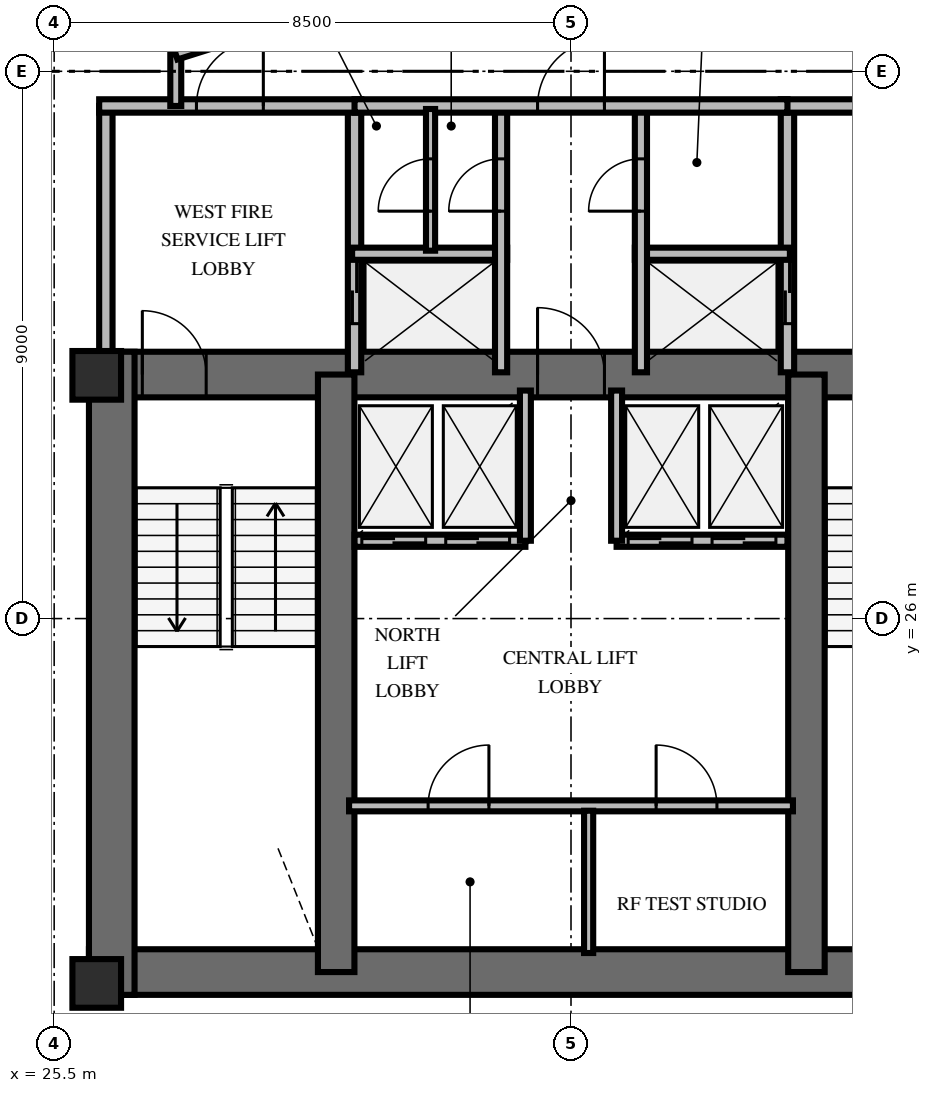
"""IFC4 building model, lengths in metres.
Left out: names, types, materials, properties, quantities, classifications, styles, units other than length and angle.
Written with IfcOpenShell. Run it as: python <this file> out.ifc"""

import sys

from ifc_helpers import new_model, si_unit, direction, frame, frame_2d, origin, origin_2d, place, context, subcontext, project, spatial, rectangle, extrude, element, fill, save


model = new_model("IFC4")
c1 = context("Model", 3, precision=1e-05, world=origin(), true_north=direction((0.0, 1.0)))
c2 = subcontext(c1, "Body", "Model", "MODEL_VIEW")
j1 = project(units=[si_unit("LENGTHUNIT", "METRE"), si_unit("PLANEANGLEUNIT", "RADIAN")], contexts=[c1])
p1 = place(None, origin())
s1 = spatial("IfcSite", under=j1, at=p1, CompositionType="ELEMENT")
p2 = place(p1, origin())
s2 = spatial("IfcBuilding", under=s1, at=p2, CompositionType="ELEMENT")
p3 = place(p2, frame((0.0, 0.0, 170.0)))
s3 = spatial("IfcBuildingStorey", under=s2, at=p3, CompositionType="ELEMENT", Elevation=170.0)
p4 = place(p3, frame((26.072, 20.187, 0.0), z_axis=(0.0, 0.0, 1.0), x_axis=(1.0, 0.0, 0.0)))
e1 = element("IfcWall", 1, at=p4, inside=s3, PredefinedType="SHEAR", context=c2, shape_type="SweptSolid", body=[
    extrude(rectangle(XDim=15.866, YDim=0.75, at=frame_2d((7.933, 0.0))), origin(), (0.0, 0.0, 1.0), 3.6),
])
p5 = place(p3, frame((26.072, 30.013, 0.0), z_axis=(0.0, 0.0, 1.0), x_axis=(1.0, 0.0, 0.0)))
e2 = element("IfcWall", 2, at=p5, inside=s3, PredefinedType="SHEAR", context=c2, shape_type="SweptSolid", body=[
    extrude(rectangle(XDim=15.866, YDim=0.75, at=frame_2d((7.933, 0.0))), origin(), (0.0, 0.0, 1.0), 3.6),
])
p6 = place(p5, frame((0.878, 0.0, 0.0)))
e3 = element("IfcOpeningElement", 3, at=p6, cuts=e2, PredefinedType="OPENING", context=c2, shape_type="SweptSolid", body=[
    extrude(rectangle(XDim=1.05, YDim=2.15, at=frame_2d((0.525, 1.075))), frame((0.0, 0.385, 0.0), z_axis=(0.0, -1.0, 0.0), x_axis=(1.0, 0.0, 0.0)), (0.0, 0.0, 1.0), 0.77),
])
p7 = place(p5, frame((13.928, 0.0, 0.0)))
e4 = element("IfcOpeningElement", 4, at=p7, cuts=e2, PredefinedType="OPENING", context=c2, shape_type="SweptSolid", body=[
    extrude(rectangle(XDim=1.05, YDim=2.15, at=frame_2d((0.525, 1.075))), frame((0.0, 0.385, 0.0), z_axis=(0.0, -1.0, 0.0), x_axis=(1.0, 0.0, 0.0)), (0.0, 0.0, 1.0), 0.77),
])
p8 = place(p5, frame((7.378, 0.0, 0.0)))
e5 = element("IfcOpeningElement", 5, at=p8, cuts=e2, PredefinedType="OPENING", context=c2, shape_type="SweptSolid", body=[
    extrude(rectangle(XDim=1.1, YDim=2.15, at=frame_2d((0.55, 1.075))), frame((0.0, 0.385, 0.0), z_axis=(0.0, -1.0, 0.0), x_axis=(1.0, 0.0, 0.0)), (0.0, 0.0, 1.0), 0.77),
])
p9 = place(p3, frame((26.447, 19.812, 0.0), z_axis=(0.0, 0.0, 1.0), x_axis=(0.0, 1.0, 0.0)))
e6 = element("IfcWall", 6, at=p9, inside=s3, PredefinedType="SHEAR", context=c2, shape_type="SweptSolid", body=[
    extrude(rectangle(XDim=10.576, YDim=0.75, at=frame_2d((5.288, 0.0))), origin(), (0.0, 0.0, 1.0), 3.6),
])
for number, where, z_axis, x_axis in (
    (7, (30.138, 20.187, 0.0), (0.0, 0.0, 1.0), (0.0, 1.0, 0.0)),
    (8, (37.872, 20.187, 0.0), (0.0, 0.0, 1.0), (0.0, 1.0, 0.0)),
):
    element("IfcWall", number, at=place(p3, frame(where, z_axis=z_axis, x_axis=x_axis)), inside=s3, PredefinedType="SHEAR", context=c2, shape_type="SweptSolid", body=[
        extrude(rectangle(XDim=9.826, YDim=0.6, at=frame_2d((4.913, 0.0))), origin(), (0.0, 0.0, 1.0), 3.6),
    ])
for number, where, z_axis, x_axis in (
    (9, (26.2, 20.0, 0.0), (0.0, 0.0, 1.0), (1.0, 0.0, 0.0)),
    (10, (26.2, 30.0, 0.0), (0.0, 0.0, 1.0), (1.0, 0.0, 0.0)),
):
    element("IfcColumn", number, at=place(p3, frame(where, z_axis=z_axis, x_axis=x_axis)), inside=s3, PredefinedType="PILASTER", context=c2, shape_type="SweptSolid", body=[
        extrude(rectangle(XDim=0.8, YDim=0.8, at=origin_2d()), origin(), (0.0, 0.0, 1.0), 3.6),
    ])
p10 = place(p3, frame((26.35, 30.05, 0.0), z_axis=(0.0, 0.0, 1.0), x_axis=(0.0, 1.0, 0.0)))
e11 = element("IfcWall", 11, at=p10, inside=s3, PredefinedType="SOLIDWALL", context=c2, shape_type="SweptSolid", body=[
    extrude(rectangle(XDim=4.38, YDim=0.22, at=frame_2d((2.19, 0.0))), origin(), (0.0, 0.0, 1.0), 2.46),
])
p11 = place(p3, frame((30.44, 30.05, 0.0), z_axis=(0.0, 0.0, 1.0), x_axis=(0.0, 1.0, 0.0)))
e12 = element("IfcWall", 12, at=p11, inside=s3, PredefinedType="SOLIDWALL", context=c2, shape_type="SweptSolid", body=[
    extrude(rectangle(XDim=4.38, YDim=0.22, at=frame_2d((2.19, 0.0))), origin(), (0.0, 0.0, 1.0), 2.46),
])
p12 = place(p11, frame((0.8, 0.0, 0.0)))
e13 = element("IfcOpeningElement", 13, at=p12, cuts=e12, PredefinedType="OPENING", context=c2, shape_type="SweptSolid", body=[
    extrude(rectangle(XDim=1.05, YDim=2.1, at=frame_2d((0.525, 1.05))), frame((0.0, 0.12, 0.0), z_axis=(0.0, -1.0, 0.0), x_axis=(1.0, 0.0, 0.0)), (0.0, 0.0, 1.0), 0.24),
])
p13 = place(p3, frame((26.24, 34.43, 0.0), z_axis=(0.0, 0.0, 1.0), x_axis=(1.0, 0.0, 0.0)))
e14 = element("IfcWall", 14, at=p13, inside=s3, PredefinedType="SOLIDWALL", context=c2, shape_type="SweptSolid", body=[
    extrude(rectangle(XDim=4.31, YDim=0.22, at=frame_2d((2.155, 0.0))), origin(), (0.0, 0.0, 1.0), 2.46),
])
p14 = place(p13, frame((1.6, 0.0, 0.0)))
e15 = element("IfcOpeningElement", 15, at=p14, cuts=e14, PredefinedType="OPENING", context=c2, shape_type="SweptSolid", body=[
    extrude(rectangle(XDim=1.1, YDim=2.15, at=frame_2d((0.55, 1.075))), frame((0.0, 0.12, 0.0), z_axis=(0.0, -1.0, 0.0), x_axis=(1.0, 0.0, 0.0)), (0.0, 0.0, 1.0), 0.24),
])
p15 = place(p3, frame((30.4, 32.0, 0.0), z_axis=(0.0, 0.0, 1.0), x_axis=(1.0, 0.0, 0.0)))
e16 = element("IfcWall", 16, at=p15, inside=s3, PredefinedType="SOLIDWALL", context=c2, shape_type="SweptSolid", body=[
    extrude(rectangle(XDim=2.55, YDim=0.2, at=frame_2d((1.275, 0.0))), origin(), (0.0, 0.0, 1.0), 2.46),
])
p16 = place(p3, frame((32.85, 30.05, 0.0), z_axis=(0.0, 0.0, 1.0), x_axis=(0.0, 1.0, 0.0)))
e17 = element("IfcWall", 17, at=p16, inside=s3, PredefinedType="SOLIDWALL", context=c2, shape_type="SweptSolid", body=[
    extrude(rectangle(XDim=4.38, YDim=0.2, at=frame_2d((2.19, 0.0))), origin(), (0.0, 0.0, 1.0), 2.46),
])
p17 = place(p16, frame((2.65, 0.0, 0.0)))
e18 = element("IfcOpeningElement", 18, at=p17, cuts=e17, PredefinedType="OPENING", context=c2, shape_type="SweptSolid", body=[
    extrude(rectangle(XDim=0.86, YDim=2.05, at=frame_2d((0.43, 1.025))), frame((0.0, 0.11, 0.0), z_axis=(0.0, -1.0, 0.0), x_axis=(1.0, 0.0, 0.0)), (0.0, 0.0, 1.0), 0.22),
])
p18 = place(p3, frame((37.56, 30.05, 0.0), z_axis=(0.0, 0.0, 1.0), x_axis=(0.0, 1.0, 0.0)))
e19 = element("IfcWall", 19, at=p18, inside=s3, PredefinedType="SOLIDWALL", context=c2, shape_type="SweptSolid", body=[
    extrude(rectangle(XDim=4.38, YDim=0.22, at=frame_2d((2.19, 0.0))), origin(), (0.0, 0.0, 1.0), 2.46),
])
p19 = place(p18, frame((0.8, 0.0, 0.0)))
e20 = element("IfcOpeningElement", 20, at=p19, cuts=e19, PredefinedType="OPENING", context=c2, shape_type="SweptSolid", body=[
    extrude(rectangle(XDim=1.05, YDim=2.1, at=frame_2d((0.525, 1.05))), frame((0.0, 0.12, 0.0), z_axis=(0.0, -1.0, 0.0), x_axis=(1.0, 0.0, 0.0)), (0.0, 0.0, 1.0), 0.24),
])
p20 = place(p3, frame((37.45, 34.43, 0.0), z_axis=(0.0, 0.0, 1.0), x_axis=(1.0, 0.0, 0.0)))
e21 = element("IfcWall", 21, at=p20, inside=s3, PredefinedType="SOLIDWALL", context=c2, shape_type="SweptSolid", body=[
    extrude(rectangle(XDim=4.31, YDim=0.22, at=frame_2d((2.155, 0.0))), origin(), (0.0, 0.0, 1.0), 2.46),
])
p21 = place(p20, frame((1.6, 0.0, 0.0)))
e22 = element("IfcOpeningElement", 22, at=p21, cuts=e21, PredefinedType="OPENING", context=c2, shape_type="SweptSolid", body=[
    extrude(rectangle(XDim=1.1, YDim=2.15, at=frame_2d((0.55, 1.075))), frame((0.0, 0.12, 0.0), z_axis=(0.0, -1.0, 0.0), x_axis=(1.0, 0.0, 0.0)), (0.0, 0.0, 1.0), 0.24),
])
p22 = place(p3, frame((35.05, 32.0, 0.0), z_axis=(0.0, 0.0, 1.0), x_axis=(1.0, 0.0, 0.0)))
e23 = element("IfcWall", 23, at=p22, inside=s3, PredefinedType="SOLIDWALL", context=c2, shape_type="SweptSolid", body=[
    extrude(rectangle(XDim=2.55, YDim=0.2, at=frame_2d((1.275, 0.0))), origin(), (0.0, 0.0, 1.0), 2.46),
])
p23 = place(p3, frame((35.15, 30.05, 0.0), z_axis=(0.0, 0.0, 1.0), x_axis=(0.0, 1.0, 0.0)))
e24 = element("IfcWall", 24, at=p23, inside=s3, PredefinedType="SOLIDWALL", context=c2, shape_type="SweptSolid", body=[
    extrude(rectangle(XDim=4.38, YDim=0.2, at=frame_2d((2.19, 0.0))), origin(), (0.0, 0.0, 1.0), 2.46),
])
p24 = place(p23, frame((2.65, 0.0, 0.0)))
e25 = element("IfcOpeningElement", 25, at=p24, cuts=e24, PredefinedType="OPENING", context=c2, shape_type="SweptSolid", body=[
    extrude(rectangle(XDim=0.86, YDim=2.05, at=frame_2d((0.43, 1.025))), frame((0.0, 0.11, 0.0), z_axis=(0.0, -1.0, 0.0), x_axis=(1.0, 0.0, 0.0)), (0.0, 0.0, 1.0), 0.22),
])
p25 = place(p3, frame((30.44, 34.43, 0.0), z_axis=(0.0, 0.0, 1.0), x_axis=(1.0, 0.0, 0.0)))
e26 = element("IfcWall", 26, at=p25, inside=s3, PredefinedType="SOLIDWALL", context=c2, shape_type="SweptSolid", body=[
    extrude(rectangle(XDim=7.12, YDim=0.22, at=frame_2d((3.56, 0.0))), origin(), (0.0, 0.0, 1.0), 2.46),
])
p26 = place(p25, frame((3.01, 0.0, 0.0)))
e27 = element("IfcOpeningElement", 27, at=p26, cuts=e26, PredefinedType="OPENING", context=c2, shape_type="SweptSolid", body=[
    extrude(rectangle(XDim=1.1, YDim=2.15, at=frame_2d((0.55, 1.075))), frame((0.0, 0.12, 0.0), z_axis=(0.0, -1.0, 0.0), x_axis=(1.0, 0.0, 0.0)), (0.0, 0.0, 1.0), 0.24),
])
p27 = place(p3, frame((31.69, 32.05, 0.0), z_axis=(0.0, 0.0, 1.0), x_axis=(0.0, 1.0, 0.0)))
e28 = element("IfcWall", 28, at=p27, inside=s3, PredefinedType="PARTITIONING", context=c2, shape_type="SweptSolid", body=[
    extrude(rectangle(XDim=2.33, YDim=0.15, at=frame_2d((1.165, 0.0))), origin(), (0.0, 0.0, 1.0), 2.46),
])
p28 = place(p27, frame((0.65, 0.0, 0.0)))
e29 = element("IfcOpeningElement", 29, at=p28, cuts=e28, PredefinedType="OPENING", context=c2, shape_type="SweptSolid", body=[
    extrude(rectangle(XDim=0.86, YDim=2.05, at=frame_2d((0.43, 1.025))), frame((0.0, 0.085, 0.0), z_axis=(0.0, -1.0, 0.0), x_axis=(1.0, 0.0, 0.0)), (0.0, 0.0, 1.0), 0.17),
])
p29 = place(p3, frame((30.35, 22.92, 0.0), z_axis=(0.0, 0.0, 1.0), x_axis=(1.0, 0.0, 0.0)))
e30 = element("IfcWall", 30, at=p29, inside=s3, PredefinedType="PARTITIONING", context=c2, shape_type="SweptSolid", body=[
    extrude(rectangle(XDim=7.3, YDim=0.18, at=frame_2d((3.65, 0.0))), origin(), (0.0, 0.0, 1.0), 2.46),
])
p30 = place(p29, frame((1.3, 0.0, 0.0)))
e31 = element("IfcOpeningElement", 31, at=p30, cuts=e30, PredefinedType="OPENING", context=c2, shape_type="SweptSolid", body=[
    extrude(rectangle(XDim=1.0, YDim=2.15, at=frame_2d((0.5, 1.075))), frame((0.0, 0.1, 0.0), z_axis=(0.0, -1.0, 0.0), x_axis=(1.0, 0.0, 0.0)), (0.0, 0.0, 1.0), 0.2),
])
p31 = place(p29, frame((5.05, 0.0, 0.0)))
e32 = element("IfcOpeningElement", 32, at=p31, cuts=e30, PredefinedType="OPENING", context=c2, shape_type="SweptSolid", body=[
    extrude(rectangle(XDim=1.0, YDim=2.15, at=frame_2d((0.5, 1.075))), frame((0.0, 0.1, 0.0), z_axis=(0.0, -1.0, 0.0), x_axis=(1.0, 0.0, 0.0)), (0.0, 0.0, 1.0), 0.2),
])
p32 = place(p3, frame((34.29, 20.5, 0.0), z_axis=(0.0, 0.0, 1.0), x_axis=(0.0, 1.0, 0.0)))
e33 = element("IfcWall", 33, at=p32, inside=s3, PredefinedType="PARTITIONING", context=c2, shape_type="SweptSolid", body=[
    extrude(rectangle(XDim=2.34, YDim=0.15, at=frame_2d((1.17, 0.0))), origin(), (0.0, 0.0, 1.0), 2.46),
])
p33 = place(p3, frame((30.44, 27.28, 0.0), z_axis=(0.0, 0.0, 1.0), x_axis=(1.0, 0.0, 0.0)))
e34 = element("IfcWall", 34, at=p33, inside=s3, PredefinedType="SOLIDWALL", context=c2, shape_type="SweptSolid", body=[
    extrude(rectangle(XDim=2.81, YDim=0.2, at=frame_2d((1.405, 0.0))), origin(), (0.0, 0.0, 1.0), 2.46),
])
p34 = place(p33, frame((0.12, 0.0, 0.0)))
e35 = element("IfcOpeningElement", 35, at=p34, cuts=e34, PredefinedType="OPENING", context=c2, shape_type="SweptSolid", body=[
    extrude(rectangle(XDim=1.05, YDim=2.1, at=frame_2d((0.525, 1.05))), frame((0.0, 0.11, 0.0), z_axis=(0.0, -1.0, 0.0), x_axis=(1.0, 0.0, 0.0)), (0.0, 0.0, 1.0), 0.22),
])
p35 = place(p33, frame((1.5, 0.0, 0.0)))
e36 = element("IfcOpeningElement", 36, at=p35, cuts=e34, PredefinedType="OPENING", context=c2, shape_type="SweptSolid", body=[
    extrude(rectangle(XDim=1.05, YDim=2.1, at=frame_2d((0.525, 1.05))), frame((0.0, 0.11, 0.0), z_axis=(0.0, -1.0, 0.0), x_axis=(1.0, 0.0, 0.0)), (0.0, 0.0, 1.0), 0.22),
])
p36 = place(p3, frame((33.25, 27.28, 0.0), z_axis=(0.0, 0.0, 1.0), x_axis=(0.0, 1.0, 0.0)))
e37 = element("IfcWall", 37, at=p36, inside=s3, PredefinedType="SOLIDWALL", context=c2, shape_type="SweptSolid", body=[
    extrude(rectangle(XDim=2.47, YDim=0.18, at=frame_2d((1.235, 0.0))), origin(), (0.0, 0.0, 1.0), 2.46),
])
p37 = place(p3, frame((34.75, 27.28, 0.0), z_axis=(0.0, 0.0, 1.0), x_axis=(1.0, 0.0, 0.0)))
e38 = element("IfcWall", 38, at=p37, inside=s3, PredefinedType="SOLIDWALL", context=c2, shape_type="SweptSolid", body=[
    extrude(rectangle(XDim=2.81, YDim=0.2, at=frame_2d((1.405, 0.0))), origin(), (0.0, 0.0, 1.0), 2.46),
])
p38 = place(p37, frame((0.19, 0.0, 0.0)))
e39 = element("IfcOpeningElement", 39, at=p38, cuts=e38, PredefinedType="OPENING", context=c2, shape_type="SweptSolid", body=[
    extrude(rectangle(XDim=1.05, YDim=2.1, at=frame_2d((0.525, 1.05))), frame((0.0, 0.11, 0.0), z_axis=(0.0, -1.0, 0.0), x_axis=(1.0, 0.0, 0.0)), (0.0, 0.0, 1.0), 0.22),
])
p39 = place(p37, frame((1.57, 0.0, 0.0)))
e40 = element("IfcOpeningElement", 40, at=p39, cuts=e38, PredefinedType="OPENING", context=c2, shape_type="SweptSolid", body=[
    extrude(rectangle(XDim=1.05, YDim=2.1, at=frame_2d((0.525, 1.05))), frame((0.0, 0.11, 0.0), z_axis=(0.0, -1.0, 0.0), x_axis=(1.0, 0.0, 0.0)), (0.0, 0.0, 1.0), 0.22),
])
p40 = place(p3, frame((34.75, 27.28, 0.0), z_axis=(0.0, 0.0, 1.0), x_axis=(0.0, 1.0, 0.0)))
e41 = element("IfcWall", 41, at=p40, inside=s3, PredefinedType="SOLIDWALL", context=c2, shape_type="SweptSolid", body=[
    extrude(rectangle(XDim=2.47, YDim=0.18, at=frame_2d((1.235, 0.0))), origin(), (0.0, 0.0, 1.0), 2.46),
])
p41 = place(p3, frame((27.5, 34.43, 0.0), z_axis=(0.0, 0.0, 1.0), x_axis=(0.0, 1.0, 0.0)))
e42 = element("IfcWall", 42, at=p41, inside=s3, PredefinedType="PARTITIONING", context=c2, shape_type="SweptSolid", body=[
    extrude(rectangle(XDim=0.85, YDim=0.18, at=frame_2d((0.425, 0.0))), origin(), (0.0, 0.0, 1.0), 2.46),
])
p42 = place(p3, frame((27.5, 35.28, 0.0), z_axis=(0.0, 0.0, 1.0), x_axis=(0.953691418528, 0.300786765376, 0.0)))
e43 = element("IfcWall", 43, at=p42, inside=s3, PredefinedType="PARTITIONING", context=c2, shape_type="SweptSolid", body=[
    extrude(rectangle(XDim=6.816, YDim=0.18, at=frame_2d((3.408, 0.0))), origin(), (0.0, 0.0, 1.0), 2.46),
])
p43 = place(p42, frame((2.858, 0.0, 0.0)))
e44 = element("IfcOpeningElement", 44, at=p43, cuts=e43, PredefinedType="OPENING", context=c2, shape_type="SweptSolid", body=[
    extrude(rectangle(XDim=1.1, YDim=2.15, at=frame_2d((0.55, 1.075))), frame((0.0, 0.1, 0.0), z_axis=(0.0, -1.0, 0.0), x_axis=(1.0, 0.0, 0.0)), (0.0, 0.0, 1.0), 0.2),
])
p44 = place(p3, frame((34.0, 37.33, 0.0), z_axis=(0.0, 0.0, 1.0), x_axis=(0.953691418528, -0.300786765376, 0.0)))
e45 = element("IfcWall", 45, at=p44, inside=s3, PredefinedType="PARTITIONING", context=c2, shape_type="SweptSolid", body=[
    extrude(rectangle(XDim=6.816, YDim=0.18, at=frame_2d((3.408, 0.0))), origin(), (0.0, 0.0, 1.0), 2.46),
])
p45 = place(p44, frame((2.858, 0.0, 0.0)))
e46 = element("IfcOpeningElement", 46, at=p45, cuts=e45, PredefinedType="OPENING", context=c2, shape_type="SweptSolid", body=[
    extrude(rectangle(XDim=1.1, YDim=2.15, at=frame_2d((0.55, 1.075))), frame((0.0, 0.1, 0.0), z_axis=(0.0, -1.0, 0.0), x_axis=(1.0, 0.0, 0.0)), (0.0, 0.0, 1.0), 0.2),
])
p46 = place(p6, origin())
e47 = element("IfcDoor", 47, at=p46, inside=s3, OperationType="SINGLE_SWING_LEFT", PredefinedType="DOOR", context=c2, shape_type="SweptSolid", body=[
    extrude(rectangle(XDim=1.05, YDim=2.15, at=frame_2d((0.525, 1.075))), frame((0.0, 0.025, 0.0), z_axis=(0.0, -1.0, 0.0), x_axis=(1.0, 0.0, 0.0)), (0.0, 0.0, 1.0), 0.05),
])
fill(e3, e47)
p47 = place(p8, origin())
e48 = element("IfcDoor", 48, at=p47, inside=s3, OperationType="SINGLE_SWING_LEFT", PredefinedType="DOOR", context=c2, shape_type="SweptSolid", body=[
    extrude(rectangle(XDim=1.1, YDim=2.15, at=frame_2d((0.55, 1.075))), frame((0.0, 0.025, 0.0), z_axis=(0.0, -1.0, 0.0), x_axis=(1.0, 0.0, 0.0)), (0.0, 0.0, 1.0), 0.05),
])
fill(e5, e48)
p48 = place(p14, origin())
e49 = element("IfcDoor", 49, at=p48, inside=s3, OperationType="SINGLE_SWING_RIGHT", PredefinedType="DOOR", context=c2, shape_type="SweptSolid", body=[
    extrude(rectangle(XDim=1.1, YDim=2.15, at=frame_2d((0.55, 1.075))), frame((0.0, 0.025, 0.0), z_axis=(0.0, -1.0, 0.0), x_axis=(1.0, 0.0, 0.0)), (0.0, 0.0, 1.0), 0.05),
])
fill(e15, e49)
p49 = place(p12, origin())
e50 = element("IfcDoor", 50, at=p49, inside=s3, OperationType="DOUBLE_DOOR_SLIDING", PredefinedType="USERDEFINED", context=c2, shape_type="SweptSolid", body=[
    extrude(rectangle(XDim=1.05, YDim=2.1, at=frame_2d((0.525, 1.05))), frame((0.0, 0.025, 0.0), z_axis=(0.0, -1.0, 0.0), x_axis=(1.0, 0.0, 0.0)), (0.0, 0.0, 1.0), 0.05),
])
fill(e13, e50)
p50 = place(p17, origin())
e51 = element("IfcDoor", 51, at=p50, inside=s3, OperationType="SINGLE_SWING_LEFT", PredefinedType="TRAPDOOR", context=c2, shape_type="SweptSolid", body=[
    extrude(rectangle(XDim=0.86, YDim=2.05, at=frame_2d((0.43, 1.025))), frame((0.0, 0.025, 0.0), z_axis=(0.0, -1.0, 0.0), x_axis=(1.0, 0.0, 0.0)), (0.0, 0.0, 1.0), 0.05),
])
fill(e18, e51)
p51 = place(p19, origin())
e52 = element("IfcDoor", 52, at=p51, inside=s3, OperationType="DOUBLE_DOOR_SLIDING", PredefinedType="USERDEFINED", context=c2, shape_type="SweptSolid", body=[
    extrude(rectangle(XDim=1.05, YDim=2.1, at=frame_2d((0.525, 1.05))), frame((0.0, 0.025, 0.0), z_axis=(0.0, -1.0, 0.0), x_axis=(1.0, 0.0, 0.0)), (0.0, 0.0, 1.0), 0.05),
])
fill(e20, e52)
p52 = place(p24, origin())
e53 = element("IfcDoor", 53, at=p52, inside=s3, OperationType="SINGLE_SWING_LEFT", PredefinedType="TRAPDOOR", context=c2, shape_type="SweptSolid", body=[
    extrude(rectangle(XDim=0.86, YDim=2.05, at=frame_2d((0.43, 1.025))), frame((0.0, 0.025, 0.0), z_axis=(0.0, -1.0, 0.0), x_axis=(1.0, 0.0, 0.0)), (0.0, 0.0, 1.0), 0.05),
])
fill(e25, e53)
p53 = place(p26, origin())
e54 = element("IfcDoor", 54, at=p53, inside=s3, OperationType="SINGLE_SWING_RIGHT", PredefinedType="DOOR", context=c2, shape_type="SweptSolid", body=[
    extrude(rectangle(XDim=1.1, YDim=2.15, at=frame_2d((0.55, 1.075))), frame((0.0, 0.025, 0.0), z_axis=(0.0, -1.0, 0.0), x_axis=(1.0, 0.0, 0.0)), (0.0, 0.0, 1.0), 0.05),
])
fill(e27, e54)
p54 = place(p28, origin())
e55 = element("IfcDoor", 55, at=p54, inside=s3, OperationType="SINGLE_SWING_LEFT", PredefinedType="TRAPDOOR", context=c2, shape_type="SweptSolid", body=[
    extrude(rectangle(XDim=0.86, YDim=2.05, at=frame_2d((0.43, 1.025))), frame((0.0, 0.025, 0.0), z_axis=(0.0, -1.0, 0.0), x_axis=(1.0, 0.0, 0.0)), (0.0, 0.0, 1.0), 0.05),
])
fill(e29, e55)
p55 = place(p30, origin())
e56 = element("IfcDoor", 56, at=p55, inside=s3, OperationType="SINGLE_SWING_RIGHT", PredefinedType="DOOR", context=c2, shape_type="SweptSolid", body=[
    extrude(rectangle(XDim=1.0, YDim=2.15, at=frame_2d((0.5, 1.075))), frame((0.0, 0.025, 0.0), z_axis=(0.0, -1.0, 0.0), x_axis=(1.0, 0.0, 0.0)), (0.0, 0.0, 1.0), 0.05),
])
fill(e31, e56)
p56 = place(p31, origin())
e57 = element("IfcDoor", 57, at=p56, inside=s3, OperationType="SINGLE_SWING_LEFT", PredefinedType="DOOR", context=c2, shape_type="SweptSolid", body=[
    extrude(rectangle(XDim=1.0, YDim=2.15, at=frame_2d((0.5, 1.075))), frame((0.0, 0.025, 0.0), z_axis=(0.0, -1.0, 0.0), x_axis=(1.0, 0.0, 0.0)), (0.0, 0.0, 1.0), 0.05),
])
fill(e32, e57)
p57 = place(p34, origin())
e58 = element("IfcDoor", 58, at=p57, inside=s3, OperationType="DOUBLE_DOOR_SLIDING", PredefinedType="USERDEFINED", context=c2, shape_type="SweptSolid", body=[
    extrude(rectangle(XDim=1.05, YDim=2.1, at=frame_2d((0.525, 1.05))), frame((0.0, 0.025, 0.0), z_axis=(0.0, -1.0, 0.0), x_axis=(1.0, 0.0, 0.0)), (0.0, 0.0, 1.0), 0.05),
])
fill(e35, e58)
p58 = place(p35, origin())
e59 = element("IfcDoor", 59, at=p58, inside=s3, OperationType="DOUBLE_DOOR_SLIDING", PredefinedType="USERDEFINED", context=c2, shape_type="SweptSolid", body=[
    extrude(rectangle(XDim=1.05, YDim=2.1, at=frame_2d((0.525, 1.05))), frame((0.0, 0.025, 0.0), z_axis=(0.0, -1.0, 0.0), x_axis=(1.0, 0.0, 0.0)), (0.0, 0.0, 1.0), 0.05),
])
fill(e36, e59)
p59 = place(p38, origin())
e60 = element("IfcDoor", 60, at=p59, inside=s3, OperationType="DOUBLE_DOOR_SLIDING", PredefinedType="USERDEFINED", context=c2, shape_type="SweptSolid", body=[
    extrude(rectangle(XDim=1.05, YDim=2.1, at=frame_2d((0.525, 1.05))), frame((0.0, 0.025, 0.0), z_axis=(0.0, -1.0, 0.0), x_axis=(1.0, 0.0, 0.0)), (0.0, 0.0, 1.0), 0.05),
])
fill(e39, e60)
p60 = place(p39, origin())
e61 = element("IfcDoor", 61, at=p60, inside=s3, OperationType="DOUBLE_DOOR_SLIDING", PredefinedType="USERDEFINED", context=c2, shape_type="SweptSolid", body=[
    extrude(rectangle(XDim=1.05, YDim=2.1, at=frame_2d((0.525, 1.05))), frame((0.0, 0.025, 0.0), z_axis=(0.0, -1.0, 0.0), x_axis=(1.0, 0.0, 0.0)), (0.0, 0.0, 1.0), 0.05),
])
fill(e40, e61)
save(model, sys.argv[1])
